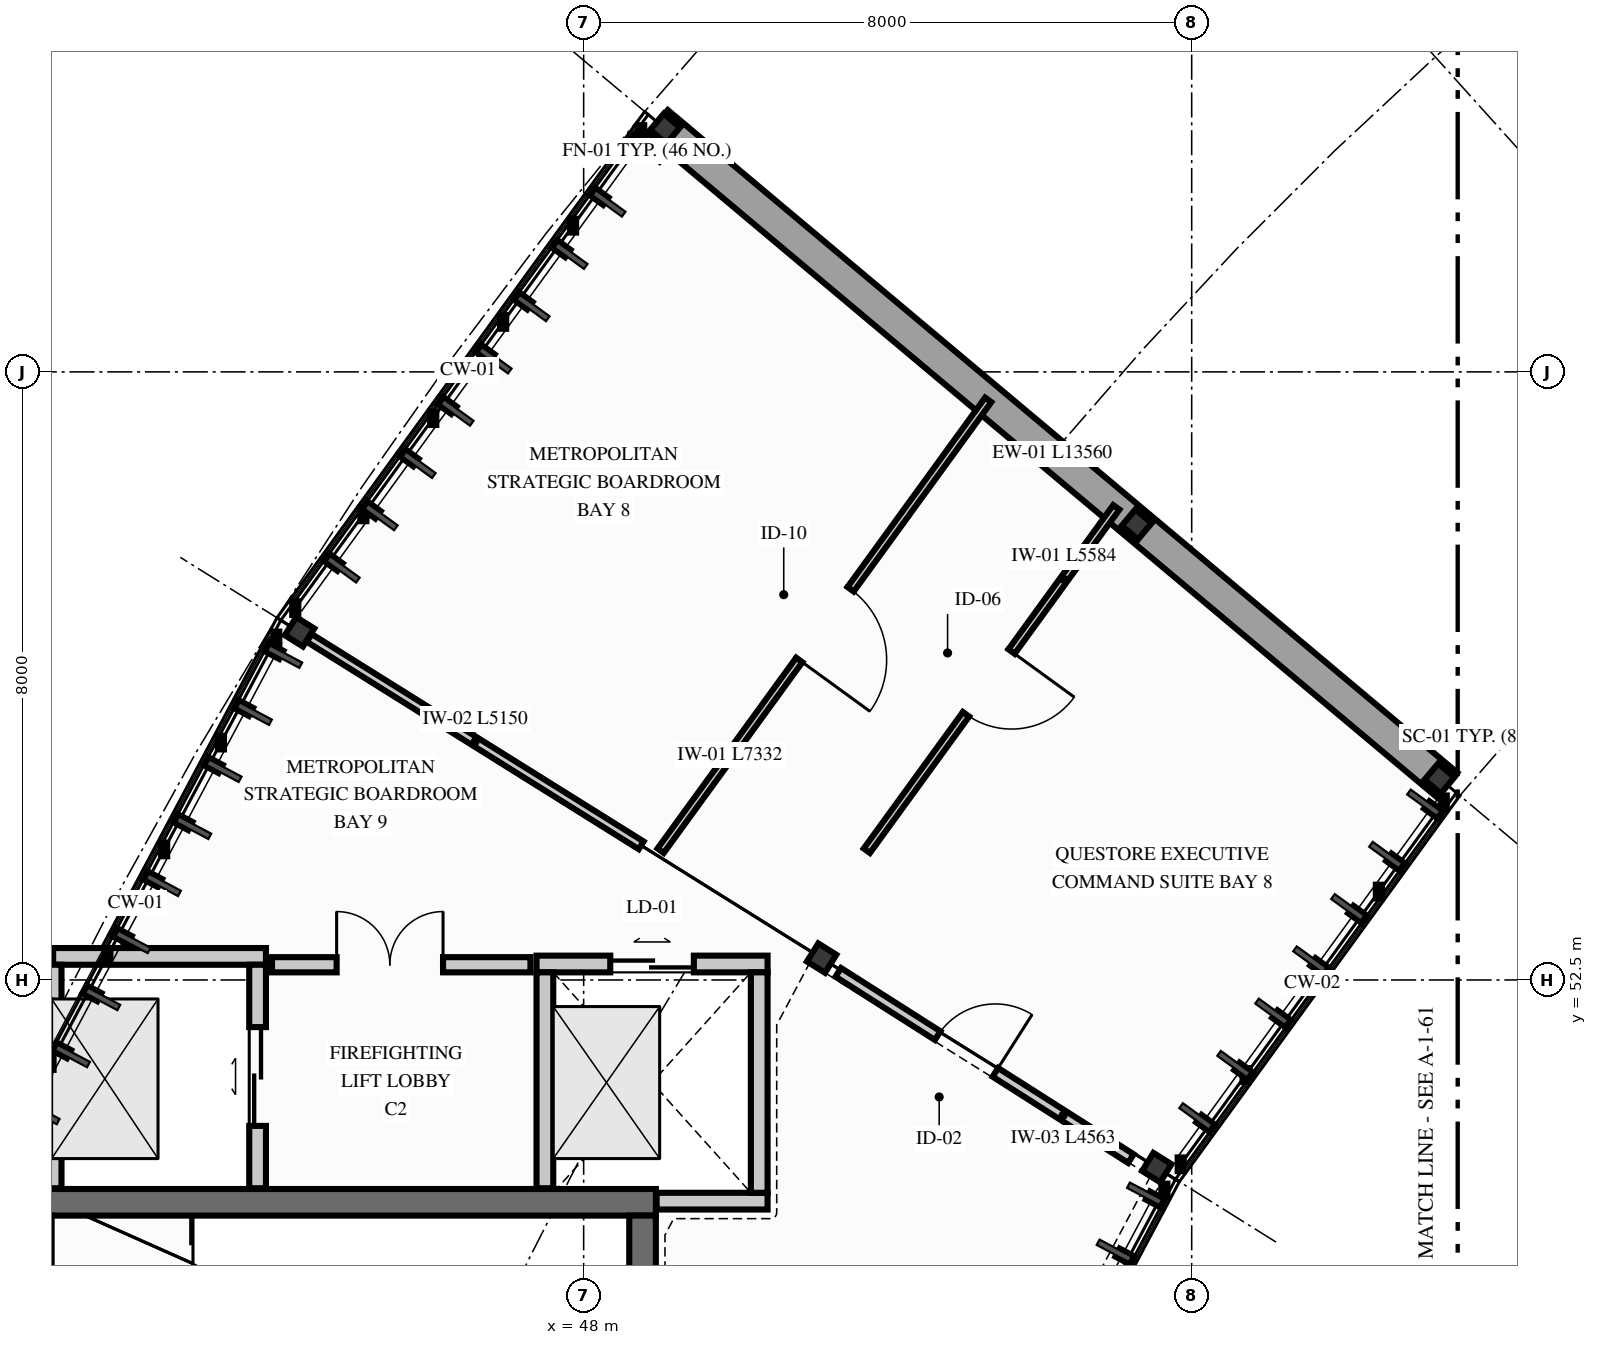
"""IFC4 building model, lengths in metres.
Left out: names, types, materials, properties, quantities, classifications, styles, units other than length and angle.
Written with IfcOpenShell. Run it as: python <this file> out.ifc"""

import sys

from ifc_helpers import new_model, si_unit, direction, frame, frame_2d, origin, origin_2d, place, context, subcontext, project, spatial, rectangle, i_section, extrude, element, fill, save


model = new_model("IFC4")
c1 = context("Model", 3, precision=1e-05, world=origin(), true_north=direction((0.0, 1.0)))
c2 = subcontext(c1, "Body", "Model", "MODEL_VIEW")
j1 = project(units=[si_unit("LENGTHUNIT", "METRE"), si_unit("PLANEANGLEUNIT", "RADIAN")], contexts=[c1])
p1 = place(None, origin())
s1 = spatial("IfcSite", under=j1, at=p1, CompositionType="ELEMENT")
p2 = place(p1, origin())
s2 = spatial("IfcBuilding", under=s1, at=p2, CompositionType="ELEMENT")
p3 = place(p2, frame((0.0, 0.0, 29.4)))
s3 = spatial("IfcBuildingStorey", under=s2, at=p3, CompositionType="ELEMENT", Elevation=29.4)
p4 = place(p3, frame((40.65, 49.575, 0.0), z_axis=(0.0, 0.0, 1.0), x_axis=(1.0, 0.0, 0.0)))
e1 = element("IfcWall", 1, at=p4, inside=s3, PredefinedType="SHEAR", context=c2, shape_type="SweptSolid", body=[
    extrude(rectangle(XDim=8.3, YDim=0.35, at=frame_2d((4.15, 0.0))), origin(), (0.0, 0.0, 1.0), 3.25),
])
p5 = place(p3, frame((48.775, 42.6, 0.0), z_axis=(0.0, 0.0, 1.0), x_axis=(0.0, 1.0, 0.0)))
e2 = element("IfcWall", 2, at=p5, inside=s3, PredefinedType="SHEAR", context=c2, shape_type="SweptSolid", body=[
    extrude(rectangle(XDim=6.8, YDim=0.35, at=frame_2d((3.4, 0.0))), origin(), (0.0, 0.0, 1.0), 3.25),
])
p6 = place(p3, frame((59.26, 55.15, 0.0), z_axis=(0.0, 0.0, 1.0), x_axis=(0.642787609687, 0.766044443119, 0.0)))
e3 = element("IfcColumn", 3, at=p6, inside=s3, PredefinedType="COLUMN", context=c2, shape_type="SweptSolid", body=[
    extrude(i_section(OverallWidth=0.28, OverallDepth=0.28, WebThickness=0.01, FlangeThickness=0.018, FilletRadius=0.024, at=origin_2d()), origin(), (0.0, 0.0, 1.0), 2.508),
])
p7 = place(p3, frame((55.277, 58.493, 0.0), z_axis=(0.0, 0.0, 1.0), x_axis=(0.642787609687, 0.766044443119, 0.0)))
e4 = element("IfcColumn", 4, at=p7, inside=s3, PredefinedType="COLUMN", context=c2, shape_type="SweptSolid", body=[
    extrude(i_section(OverallWidth=0.28, OverallDepth=0.28, WebThickness=0.01, FlangeThickness=0.018, FilletRadius=0.024, at=origin_2d()), origin(), (0.0, 0.0, 1.0), 3.362),
])
p8 = place(p3, frame((49.072, 63.699, 0.0), z_axis=(0.0, 0.0, 1.0), x_axis=(0.642787609687, 0.766044443119, 0.0)))
e5 = element("IfcColumn", 5, at=p8, inside=s3, PredefinedType="COLUMN", context=c2, shape_type="SweptSolid", body=[
    extrude(i_section(OverallWidth=0.28, OverallDepth=0.28, WebThickness=0.01, FlangeThickness=0.018, FilletRadius=0.024, at=origin_2d()), origin(), (0.0, 0.0, 1.0), 2.508),
])
p9 = place(p3, frame((55.541, 50.032, 0.0), z_axis=(0.0, 0.0, 1.0), x_axis=(0.529919264233, 0.848048096156, 0.0)))
e6 = element("IfcColumn", 6, at=p9, inside=s3, PredefinedType="COLUMN", context=c2, shape_type="SweptSolid", body=[
    extrude(i_section(OverallWidth=0.28, OverallDepth=0.28, WebThickness=0.01, FlangeThickness=0.018, FilletRadius=0.024, at=origin_2d()), origin(), (0.0, 0.0, 1.0), 2.708),
])
p10 = place(p3, frame((51.131, 52.787, 0.0), z_axis=(0.0, 0.0, 1.0), x_axis=(0.529919264233, 0.848048096156, 0.0)))
e7 = element("IfcColumn", 7, at=p10, inside=s3, PredefinedType="COLUMN", context=c2, shape_type="SweptSolid", body=[
    extrude(i_section(OverallWidth=0.28, OverallDepth=0.28, WebThickness=0.01, FlangeThickness=0.018, FilletRadius=0.024, at=origin_2d()), origin(), (0.0, 0.0, 1.0), 3.562),
])
p11 = place(p3, frame((44.262, 57.08, 0.0), z_axis=(0.0, 0.0, 1.0), x_axis=(0.529919264233, 0.848048096156, 0.0)))
e8 = element("IfcColumn", 8, at=p11, inside=s3, PredefinedType="COLUMN", context=c2, shape_type="SweptSolid", body=[
    extrude(i_section(OverallWidth=0.28, OverallDepth=0.28, WebThickness=0.01, FlangeThickness=0.018, FilletRadius=0.024, at=origin_2d()), origin(), (0.0, 0.0, 1.0), 2.708),
])
p12 = place(p3, frame((59.36, 55.067, 0.0), z_axis=(0.0, 0.0, 1.0), x_axis=(-0.766044541589, 0.642787492334, 0.0)))
e9 = element("IfcWall", 9, at=p12, inside=s3, PredefinedType="SOLIDWALL", context=c2, shape_type="SweptSolid", body=[
    extrude(rectangle(XDim=13.56, YDim=0.42, at=frame_2d((6.78, 0.0))), origin(), (0.0, 0.0, 1.0), 2.45),
])
p13 = place(p3, frame((41.02, 52.81, 0.0), z_axis=(0.0, 0.0, 1.0), x_axis=(1.0, 0.0, 0.0)))
e10 = element("IfcWall", 10, at=p13, inside=s3, PredefinedType="PARTITIONING", context=c2, shape_type="SweptSolid", body=[
    extrude(rectangle(XDim=2.8, YDim=0.22, at=frame_2d((1.4, 0.0))), origin(), (0.0, 0.0, 1.0), 2.866),
])
p14 = place(p3, frame((41.02, 49.76, 0.0), z_axis=(0.0, 0.0, 1.0), x_axis=(0.0, 1.0, 0.0)))
e11 = element("IfcWall", 11, at=p14, inside=s3, PredefinedType="PARTITIONING", context=c2, shape_type="SweptSolid", body=[
    extrude(rectangle(XDim=2.94, YDim=0.22, at=frame_2d((1.47, 0.0))), origin(), (0.0, 0.0, 1.0), 2.826),
])
p15 = place(p3, frame((43.71, 49.76, 0.0), z_axis=(0.0, 0.0, 1.0), x_axis=(0.0, 1.0, 0.0)))
e12 = element("IfcWall", 12, at=p15, inside=s3, PredefinedType="PARTITIONING", context=c2, shape_type="SweptSolid", body=[
    extrude(rectangle(XDim=2.94, YDim=0.22, at=frame_2d((1.47, 0.0))), origin(), (0.0, 0.0, 1.0), 3.194),
])
p16 = place(p15, frame((0.82, 0.0, 0.0)))
e13 = element("IfcOpeningElement", 13, at=p16, cuts=e12, PredefinedType="OPENING", context=c2, shape_type="SweptSolid", body=[
    extrude(rectangle(XDim=1.3, YDim=2.2, at=frame_2d((0.65, 1.1))), frame((0.0, 0.12, 0.0), z_axis=(0.0, -1.0, 0.0), x_axis=(1.0, 0.0, 0.0)), (0.0, 0.0, 1.0), 0.24),
])
p17 = place(p3, frame((48.96, 49.59, 0.0), z_axis=(0.0, 0.0, 1.0), x_axis=(1.0, 0.0, 0.0)))
e14 = element("IfcWall", 14, at=p17, inside=s3, PredefinedType="PARTITIONING", context=c2, shape_type="SweptSolid", body=[
    extrude(rectangle(XDim=1.46, YDim=0.22, at=frame_2d((0.73, 0.0))), origin(), (0.0, 0.0, 1.0), 3.2),
])
p18 = place(p3, frame((47.38, 52.71, 0.0), z_axis=(0.0, 0.0, 1.0), x_axis=(1.0, 0.0, 0.0)))
e15 = element("IfcWall", 15, at=p18, inside=s3, PredefinedType="PARTITIONING", context=c2, shape_type="SweptSolid", body=[
    extrude(rectangle(XDim=3.04, YDim=0.22, at=frame_2d((1.52, 0.0))), origin(), (0.0, 0.0, 1.0), 3.2),
])
p19 = place(p18, frame((0.97, 0.0, 0.0)))
e16 = element("IfcOpeningElement", 16, at=p19, cuts=e15, PredefinedType="OPENING", context=c2, shape_type="SweptSolid", body=[
    extrude(rectangle(XDim=1.1, YDim=2.15, at=frame_2d((0.55, 1.075))), frame((0.0, 0.12, 0.0), z_axis=(0.0, -1.0, 0.0), x_axis=(1.0, 0.0, 0.0)), (0.0, 0.0, 1.0), 0.24),
])
p20 = place(p3, frame((47.49, 49.76, 0.0), z_axis=(0.0, 0.0, 1.0), x_axis=(0.0, 1.0, 0.0)))
e17 = element("IfcWall", 17, at=p20, inside=s3, PredefinedType="PARTITIONING", context=c2, shape_type="SweptSolid", body=[
    extrude(rectangle(XDim=2.84, YDim=0.22, at=frame_2d((1.42, 0.0))), origin(), (0.0, 0.0, 1.0), 3.2),
])
p21 = place(p3, frame((50.31, 49.7, 0.0), z_axis=(0.0, 0.0, 1.0), x_axis=(0.0, 1.0, 0.0)))
e18 = element("IfcWall", 18, at=p21, inside=s3, PredefinedType="PARTITIONING", context=c2, shape_type="SweptSolid", body=[
    extrude(rectangle(XDim=2.9, YDim=0.22, at=frame_2d((1.45, 0.0))), origin(), (0.0, 0.0, 1.0), 3.2),
])
p22 = place(p3, frame((43.9, 52.7, 0.0), z_axis=(0.0, 0.0, 1.0), x_axis=(1.0, 0.0, 0.0)))
e19 = element("IfcWall", 19, at=p22, inside=s3, PredefinedType="PARTITIONING", context=c2, shape_type="SweptSolid", body=[
    extrude(rectangle(XDim=3.4, YDim=0.2, at=frame_2d((1.7, 0.0))), origin(), (0.0, 0.0, 1.0), 3.2),
])
p23 = place(p22, frame((0.85, 0.0, 0.0)))
e20 = element("IfcOpeningElement", 20, at=p23, cuts=e19, PredefinedType="OPENING", context=c2, shape_type="SweptSolid", body=[
    extrude(rectangle(XDim=1.4, YDim=2.25, at=frame_2d((0.7, 1.125))), frame((0.0, 0.11, 0.0), z_axis=(0.0, -1.0, 0.0), x_axis=(1.0, 0.0, 0.0)), (0.0, 0.0, 1.0), 0.22),
])
p24 = place(p3, frame((51.35, 52.6, 0.0), z_axis=(0.0, 0.0, 1.0), x_axis=(0.84363284859, -0.536920493909, 0.0)))
e21 = element("IfcWall", 21, at=p24, inside=s3, PredefinedType="PARTITIONING", context=c2, shape_type="SweptSolid", body=[
    extrude(rectangle(XDim=4.563, YDim=0.135, at=frame_2d((2.282, 0.0))), origin(), (0.0, 0.0, 1.0), 3.102),
])
p25 = place(p24, frame((1.55, 0.0, 0.0)))
e22 = element("IfcOpeningElement", 22, at=p25, cuts=e21, PredefinedType="OPENING", context=c2, shape_type="SweptSolid", body=[
    extrude(rectangle(XDim=0.9, YDim=2.1, at=frame_2d((0.45, 1.05))), frame((0.0, 0.077, 0.0), z_axis=(0.0, -1.0, 0.0), x_axis=(1.0, 0.0, 0.0)), (0.0, 0.0, 1.0), 0.155),
])
p26 = place(p3, frame((55.008, 58.718, 0.0), z_axis=(0.0, 0.0, 1.0), x_axis=(-0.587773920785, -0.809025227076, 0.0)))
e23 = element("IfcWall", 23, at=p26, inside=s3, PredefinedType="PARTITIONING", context=c2, shape_type="SweptSolid", body=[
    extrude(rectangle(XDim=5.584, YDim=0.1, at=frame_2d((2.792, 0.0))), origin(), (0.0, 0.0, 1.0), 3.2),
])
p27 = place(p26, frame((2.345, 0.0, 0.0)))
e24 = element("IfcOpeningElement", 24, at=p27, cuts=e23, PredefinedType="OPENING", context=c2, shape_type="SweptSolid", body=[
    extrude(rectangle(XDim=1.02, YDim=2.18, at=frame_2d((0.51, 1.09))), frame((0.0, 0.06, 0.0), z_axis=(0.0, -1.0, 0.0), x_axis=(1.0, 0.0, 0.0)), (0.0, 0.0, 1.0), 0.12),
])
p28 = place(p3, frame((53.323, 60.132, 0.0), z_axis=(0.0, 0.0, 1.0), x_axis=(-0.587773694682, -0.809025391344, 0.0)))
e25 = element("IfcWall", 25, at=p28, inside=s3, PredefinedType="PARTITIONING", context=c2, shape_type="SweptSolid", body=[
    extrude(rectangle(XDim=7.333, YDim=0.1, at=frame_2d((3.666, 0.0))), origin(), (0.0, 0.0, 1.0), 3.2),
])
p29 = place(p28, frame((3.08, 0.0, 0.0)))
e26 = element("IfcOpeningElement", 26, at=p29, cuts=e25, PredefinedType="OPENING", context=c2, shape_type="SweptSolid", body=[
    extrude(rectangle(XDim=1.15, YDim=2.2, at=frame_2d((0.575, 1.1))), frame((0.0, 0.06, 0.0), z_axis=(0.0, -1.0, 0.0), x_axis=(1.0, 0.0, 0.0)), (0.0, 0.0, 1.0), 0.12),
])
p30 = place(p3, frame((48.757, 54.271, 0.0), z_axis=(0.0, 0.0, 1.0), x_axis=(-0.848054228257, 0.529909450694, 0.0)))
e27 = element("IfcWall", 27, at=p30, inside=s3, PredefinedType="PARTITIONING", context=c2, shape_type="SweptSolid", body=[
    extrude(rectangle(XDim=5.15, YDim=0.12, at=frame_2d((2.575, 0.0))), origin(), (0.0, 0.0, 1.0), 3.115),
])
p31 = place(p16, origin())
e28 = element("IfcDoor", 28, at=p31, inside=s3, OperationType="DOUBLE_DOOR_SLIDING", PredefinedType="DOOR", context=c2, shape_type="SweptSolid", body=[
    extrude(rectangle(XDim=1.3, YDim=2.2, at=frame_2d((0.65, 1.1))), frame((0.0, 0.025, 0.0), z_axis=(0.0, -1.0, 0.0), x_axis=(1.0, 0.0, 0.0)), (0.0, 0.0, 1.0), 0.05),
])
fill(e13, e28)
p32 = place(p19, origin())
e29 = element("IfcDoor", 29, at=p32, inside=s3, OperationType="DOUBLE_DOOR_SLIDING", PredefinedType="DOOR", context=c2, shape_type="SweptSolid", body=[
    extrude(rectangle(XDim=1.1, YDim=2.15, at=frame_2d((0.55, 1.075))), frame((0.0, 0.025, 0.0), z_axis=(0.0, -1.0, 0.0), x_axis=(1.0, 0.0, 0.0)), (0.0, 0.0, 1.0), 0.05),
])
fill(e16, e29)
p33 = place(p23, origin())
e30 = element("IfcDoor", 30, at=p33, inside=s3, OperationType="DOUBLE_DOOR_SINGLE_SWING", PredefinedType="DOOR", context=c2, shape_type="SweptSolid", body=[
    extrude(rectangle(XDim=1.4, YDim=2.25, at=frame_2d((0.7, 1.125))), frame((0.0, 0.025, 0.0), z_axis=(0.0, -1.0, 0.0), x_axis=(1.0, 0.0, 0.0)), (0.0, 0.0, 1.0), 0.05),
])
fill(e20, e30)
p34 = place(p25, origin())
e31 = element("IfcDoor", 31, at=p34, inside=s3, OperationType="SINGLE_SWING_RIGHT", PredefinedType="DOOR", context=c2, shape_type="SweptSolid", body=[
    extrude(rectangle(XDim=0.9, YDim=2.1, at=frame_2d((0.45, 1.05))), frame((0.0, 0.025, 0.0), z_axis=(0.0, -1.0, 0.0), x_axis=(1.0, 0.0, 0.0)), (0.0, 0.0, 1.0), 0.05),
])
fill(e22, e31)
p35 = place(p27, origin())
e32 = element("IfcDoor", 32, at=p35, inside=s3, OperationType="SINGLE_SWING_LEFT", PredefinedType="DOOR", context=c2, shape_type="SweptSolid", body=[
    extrude(rectangle(XDim=1.02, YDim=2.18, at=frame_2d((0.51, 1.09))), frame((0.0, 0.025, 0.0), z_axis=(0.0, -1.0, 0.0), x_axis=(1.0, 0.0, 0.0)), (0.0, 0.0, 1.0), 0.05),
])
fill(e24, e32)
p36 = place(p29, origin())
e33 = element("IfcDoor", 33, at=p36, inside=s3, OperationType="SINGLE_SWING_RIGHT", PredefinedType="DOOR", context=c2, shape_type="SweptSolid", body=[
    extrude(rectangle(XDim=1.15, YDim=2.2, at=frame_2d((0.575, 1.1))), frame((0.0, 0.025, 0.0), z_axis=(0.0, -1.0, 0.0), x_axis=(1.0, 0.0, 0.0)), (0.0, 0.0, 1.0), 0.05),
])
fill(e26, e33)
save(model, sys.argv[1])
